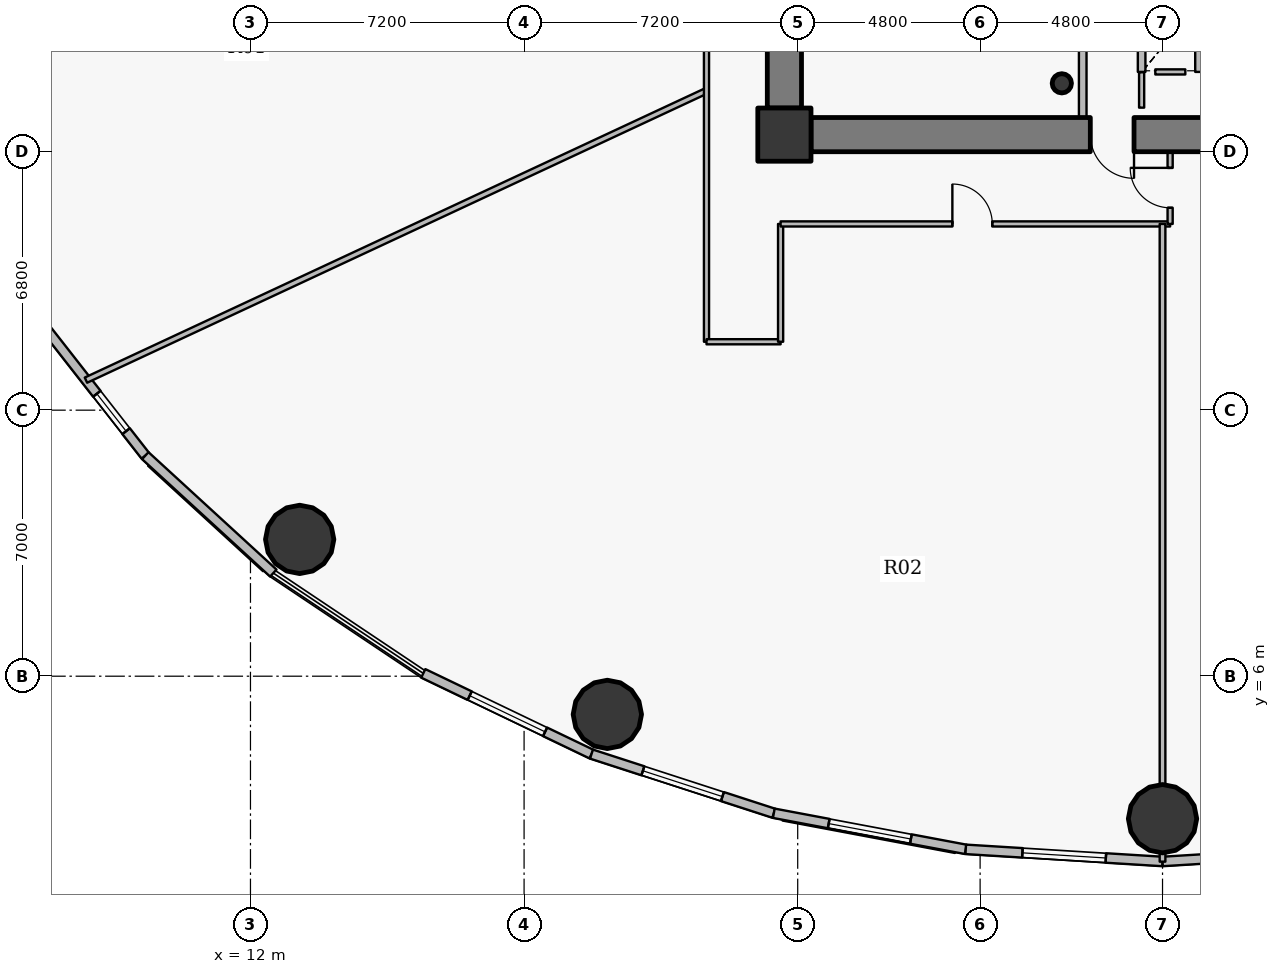
"""IFC4 building model, lengths in metres.
Left out: names, types, materials, properties, quantities, classifications, styles, units other than length and angle.
Written with IfcOpenShell. Run it as: python <this file> out.ifc"""

import sys

from ifc_helpers import new_model, si_unit, direction, frame, frame_2d, origin, origin_2d, place, context, subcontext, project, spatial, rectangle, hollow_circle, extrude, source, transform, mapped, element, fill, save


model = new_model("IFC4")
c1 = context("Model", 3, precision=1e-05, world=origin(), true_north=direction((0.0, 1.0)))
c2 = subcontext(c1, "Body", "Model", "MODEL_VIEW")
j1 = project(units=[si_unit("LENGTHUNIT", "METRE"), si_unit("PLANEANGLEUNIT", "RADIAN")], contexts=[c1])
p1 = place(None, origin())
s1 = spatial("IfcSite", under=j1, at=p1, CompositionType="ELEMENT")
p2 = place(p1, origin())
s2 = spatial("IfcBuilding", under=s1, at=p2, CompositionType="ELEMENT")
p3 = place(p2, frame((0.0, 0.0, 22.8)))
s3 = spatial("IfcBuildingStorey", under=s2, at=p3, CompositionType="ELEMENT", Elevation=22.8)
p4 = place(p3, frame((26.05, 20.25, 0.0), z_axis=(0.0, 0.0, 1.0), x_axis=(1.0, 0.0, 0.0)))
e1 = element("IfcColumn", 1, at=p4, inside=s3, PredefinedType="COLUMN", context=c2, shape_type="SweptSolid", body=[
    extrude(rectangle(XDim=1.4, YDim=1.4, at=origin_2d()), origin(), (0.0, 0.0, 1.0), 4.2),
])
p5 = place(p3, frame((33.35, 21.6, 0.0), z_axis=(0.0, 0.0, 1.0), x_axis=(1.0, 0.0, 0.0)))
e2 = element("IfcColumn", 2, at=p5, inside=s3, PredefinedType="COLUMN", context=c2, shape_type="SweptSolid", body=[
    extrude(hollow_circle(Radius=0.254, WallThickness=0.02, at=origin_2d()), origin(), (0.0, 0.0, 1.0), 4.2),
])
p6 = place(p3, frame((45.25, 20.25, 0.0), z_axis=(0.0, 0.0, 1.0), x_axis=(-1.0, 0.0, 0.0)))
e3 = element("IfcWall", 3, at=p6, inside=s3, PredefinedType="SHEAR", context=c2, shape_type="SweptSolid", body=[
    extrude(rectangle(XDim=18.5, YDim=0.9, at=frame_2d((9.25, 0.0))), origin(), (0.0, 0.0, 1.0), 3.35),
])
p7 = place(p6, frame((10.0, 0.0, 0.0)))
e4 = element("IfcOpeningElement", 4, at=p7, cuts=e3, PredefinedType="OPENING", context=c2, shape_type="SweptSolid", body=[
    extrude(rectangle(XDim=1.15, YDim=2.15, at=origin_2d()), frame((0.575, 0.46, 1.075), z_axis=(0.0, -1.0, 0.0), x_axis=(1.0, 0.0, 0.0)), (0.0, 0.0, 1.0), 0.92),
])
p8 = place(p3, frame((26.05, 20.95, 0.0), z_axis=(0.0, 0.0, 1.0), x_axis=(0.0, 1.0, 0.0)))
e5 = element("IfcWall", 5, at=p8, inside=s3, PredefinedType="SHEAR", context=c2, shape_type="SweptSolid", body=[
    extrude(rectangle(XDim=12.1, YDim=0.9, at=frame_2d((6.05, 0.0))), origin(), (0.0, 0.0, 1.0), 3.35),
])
p9 = place(p8, frame((5.64, 0.0, 0.0)))
e6 = element("IfcOpeningElement", 6, at=p9, cuts=e5, PredefinedType="OPENING", context=c2, shape_type="SweptSolid", body=[
    extrude(rectangle(XDim=0.82, YDim=2.1, at=origin_2d()), frame((0.41, 0.46, 1.05), z_axis=(0.0, -1.0, 0.0), x_axis=(1.0, 0.0, 0.0)), (0.0, 0.0, 1.0), 0.92),
])
for number, where, z_axis, x_axis in (
    (7, (13.295, 9.599, 0.0), (0.0, 0.0, 1.0), (1.0, 0.0, 0.0)),
    (8, (21.391, 4.995, 0.0), (0.0, 0.0, 1.0), (1.0, 0.0, 0.0)),
    (9, (36.0, 2.25, 0.0), (0.0, 0.0, 1.0), (1.0, 0.0, 0.0)),
):
    element("IfcColumn", number, at=place(p3, frame(where, z_axis=z_axis, x_axis=x_axis)), inside=s3, PredefinedType="COLUMN", context=c2, shape_type="SweptSolid", body=[
        extrude(hollow_circle(Radius=0.9, WallThickness=0.05, at=origin_2d()), origin(), (0.0, 0.0, 1.0), 4.2),
    ])
p10 = place(p3, frame((9.232, 11.802, 0.0), z_axis=(0.0, 0.0, 1.0), x_axis=(-0.61622589112, 0.787569457961, 0.0)))
e10 = element("IfcWall", 10, at=p10, inside=s3, PredefinedType="SOLIDWALL", context=c2, shape_type="SweptSolid", body=[
    extrude(rectangle(XDim=4.396, YDim=0.25, at=frame_2d((2.198, 0.0))), origin(), (0.0, 0.0, 1.0), 3.9),
])
p11 = place(p10, frame((0.819, 0.0, 0.9)))
e11 = element("IfcOpeningElement", 11, at=p11, cuts=e10, PredefinedType="OPENING", context=c2, shape_type="SweptSolid", body=[
    extrude(rectangle(XDim=1.25, YDim=1.65, at=origin_2d()), frame((0.625, 0.135, 0.825), z_axis=(0.0, -1.0, 0.0), x_axis=(1.0, 0.0, 0.0)), (0.0, 0.0, 1.0), 0.27),
])
p12 = place(p3, frame((12.601, 8.714, 0.0), z_axis=(0.0, 0.0, 1.0), x_axis=(-0.737076532105, 0.675809282136, 0.0)))
e12 = element("IfcWall", 12, at=p12, inside=s3, PredefinedType="SOLIDWALL", context=c2, shape_type="SweptSolid", body=[
    extrude(rectangle(XDim=4.571, YDim=0.25, at=frame_2d((2.285, 0.0))), origin(), (0.0, 0.0, 1.0), 3.9),
])
p13 = place(p3, frame((20.974, 3.95, 0.0), z_axis=(0.0, 0.0, 1.0), x_axis=(-0.901559523397, 0.432655088692, 0.0)))
e13 = element("IfcWall", 13, at=p13, inside=s3, PredefinedType="SOLIDWALL", context=c2, shape_type="SweptSolid", body=[
    extrude(rectangle(XDim=4.91, YDim=0.25, at=frame_2d((2.455, 0.0))), origin(), (0.0, 0.0, 1.0), 3.9),
])
p14 = place(p13, frame((1.355, 0.0, 0.9)))
e14 = element("IfcOpeningElement", 14, at=p14, cuts=e13, PredefinedType="OPENING", context=c2, shape_type="SweptSolid", body=[
    extrude(rectangle(XDim=2.2, YDim=2.0, at=origin_2d()), frame((1.1, 0.135, 1.0), z_axis=(0.0, -1.0, 0.0), x_axis=(1.0, 0.0, 0.0)), (0.0, 0.0, 1.0), 0.27),
])
p15 = place(p3, frame((25.771, 2.394, 0.0), z_axis=(0.0, 0.0, 1.0), x_axis=(-0.951198629726, 0.308579271513, 0.0)))
e15 = element("IfcWall", 15, at=p15, inside=s3, PredefinedType="SOLIDWALL", context=c2, shape_type="SweptSolid", body=[
    extrude(rectangle(XDim=5.044, YDim=0.25, at=frame_2d((2.522, 0.0))), origin(), (0.0, 0.0, 1.0), 3.9),
])
p16 = place(p15, frame((1.422, 0.0, 0.9)))
e16 = element("IfcOpeningElement", 16, at=p16, cuts=e15, PredefinedType="OPENING", context=c2, shape_type="SweptSolid", body=[
    extrude(rectangle(XDim=2.2, YDim=2.0, at=origin_2d()), frame((1.1, 0.135, 1.0), z_axis=(0.0, -1.0, 0.0), x_axis=(1.0, 0.0, 0.0)), (0.0, 0.0, 1.0), 0.27),
])
p17 = place(p3, frame((30.822, 1.444, 0.0), z_axis=(0.0, 0.0, 1.0), x_axis=(-0.98278278947, 0.184764684726, 0.0)))
e17 = element("IfcWall", 17, at=p17, inside=s3, PredefinedType="SOLIDWALL", context=c2, shape_type="SweptSolid", body=[
    extrude(rectangle(XDim=5.139, YDim=0.25, at=frame_2d((2.569, 0.0))), origin(), (0.0, 0.0, 1.0), 3.9),
])
p18 = place(p17, frame((1.469, 0.0, 0.9)))
e18 = element("IfcOpeningElement", 18, at=p18, cuts=e17, PredefinedType="OPENING", context=c2, shape_type="SweptSolid", body=[
    extrude(rectangle(XDim=2.2, YDim=2.0, at=origin_2d()), frame((1.1, 0.135, 1.0), z_axis=(0.0, -1.0, 0.0), x_axis=(1.0, 0.0, 0.0)), (0.0, 0.0, 1.0), 0.27),
])
p19 = place(p3, frame((36.0, 1.125, 0.0), z_axis=(0.0, 0.0, 1.0), x_axis=(-0.998106762298, 0.061505211614, 0.0)))
e19 = element("IfcWall", 19, at=p19, inside=s3, PredefinedType="SOLIDWALL", context=c2, shape_type="SweptSolid", body=[
    extrude(rectangle(XDim=5.188, YDim=0.25, at=frame_2d((2.594, 0.0))), origin(), (0.0, 0.0, 1.0), 3.9),
])
p20 = place(p19, frame((1.494, 0.0, 0.9)))
e20 = element("IfcOpeningElement", 20, at=p20, cuts=e19, PredefinedType="OPENING", context=c2, shape_type="SweptSolid", body=[
    extrude(rectangle(XDim=2.2, YDim=2.0, at=origin_2d()), frame((1.1, 0.135, 1.0), z_axis=(0.0, -1.0, 0.0), x_axis=(1.0, 0.0, 0.0)), (0.0, 0.0, 1.0), 0.27),
])
p21 = place(p3, frame((41.178, 1.444, 0.0), z_axis=(0.0, 0.0, 1.0), x_axis=(-0.998106762298, -0.061505211614, 0.0)))
e21 = element("IfcWall", 21, at=p21, inside=s3, PredefinedType="SOLIDWALL", context=c2, shape_type="SweptSolid", body=[
    extrude(rectangle(XDim=5.188, YDim=0.25, at=frame_2d((2.594, 0.0))), origin(), (0.0, 0.0, 1.0), 3.9),
])
p22 = place(p21, frame((1.494, 0.0, 0.9)))
e22 = element("IfcOpeningElement", 22, at=p22, cuts=e21, PredefinedType="OPENING", context=c2, shape_type="SweptSolid", body=[
    extrude(rectangle(XDim=2.2, YDim=2.0, at=origin_2d()), frame((1.1, 0.135, 1.0), z_axis=(0.0, -1.0, 0.0), x_axis=(1.0, 0.0, 0.0)), (0.0, 0.0, 1.0), 0.27),
])
p23 = place(p3, frame((7.671, 13.79, 0.0), z_axis=(0.0, 0.0, 1.0), x_axis=(0.906305303078, 0.422623588567, 0.0)))
e23 = element("IfcWall", 23, at=p23, inside=s3, PredefinedType="PARTITIONING", context=c2, shape_type="SweptSolid", body=[
    extrude(rectangle(XDim=18.017, YDim=0.15, at=frame_2d((9.009, 0.0))), origin(), (0.0, 0.0, 1.0), 3.085),
])
p24 = place(p3, frame((24.0, 14.8, 0.0), z_axis=(0.0, 0.0, 1.0), x_axis=(0.0, 1.0, 0.0)))
e24 = element("IfcWall", 24, at=p24, inside=s3, PredefinedType="PARTITIONING", context=c2, shape_type="SweptSolid", body=[
    extrude(rectangle(XDim=12.78, YDim=0.135, at=frame_2d((6.39, 0.0))), origin(), (0.0, 0.0, 1.0), 2.685),
])
p25 = place(p24, frame((9.147, 0.0, 0.0)))
e25 = element("IfcOpeningElement", 25, at=p25, cuts=e24, PredefinedType="OPENING", context=c2, shape_type="SweptSolid", body=[
    extrude(rectangle(XDim=1.05, YDim=2.15, at=origin_2d()), frame((0.525, 0.078, 1.075), z_axis=(0.0, -1.0, 0.0), x_axis=(1.0, 0.0, 0.0)), (0.0, 0.0, 1.0), 0.155),
])
p26 = place(p3, frame((24.0, 14.8, 0.0), z_axis=(0.0, 0.0, 1.0), x_axis=(1.0, 0.0, 0.0)))
e26 = element("IfcWall", 26, at=p26, inside=s3, PredefinedType="PARTITIONING", context=c2, shape_type="SweptSolid", body=[
    extrude(rectangle(XDim=1.95, YDim=0.135, at=frame_2d((0.975, 0.0))), origin(), (0.0, 0.0, 1.0), 3.9),
])
p27 = place(p3, frame((25.95, 14.8, 0.0), z_axis=(0.0, 0.0, 1.0), x_axis=(0.0, 1.0, 0.0)))
e27 = element("IfcWall", 27, at=p27, inside=s3, PredefinedType="PARTITIONING", context=c2, shape_type="SweptSolid", body=[
    extrude(rectangle(XDim=3.1, YDim=0.135, at=frame_2d((1.55, 0.0))), origin(), (0.0, 0.0, 1.0), 3.9),
])
p28 = place(p3, frame((25.95, 17.9, 0.0), z_axis=(0.0, 0.0, 1.0), x_axis=(1.0, 0.0, 0.0)))
e28 = element("IfcWall", 28, at=p28, inside=s3, PredefinedType="PARTITIONING", context=c2, shape_type="SweptSolid", body=[
    extrude(rectangle(XDim=10.25, YDim=0.135, at=frame_2d((5.125, 0.0))), origin(), (0.0, 0.0, 1.0), 2.685),
])
p29 = place(p28, frame((4.52, 0.0, 0.0)))
e29 = element("IfcOpeningElement", 29, at=p29, cuts=e28, PredefinedType="OPENING", context=c2, shape_type="SweptSolid", body=[
    extrude(rectangle(XDim=1.05, YDim=2.15, at=origin_2d()), frame((0.525, 0.078, 1.075), z_axis=(0.0, -1.0, 0.0), x_axis=(1.0, 0.0, 0.0)), (0.0, 0.0, 1.0), 0.155),
])
p30 = place(p3, frame((33.9, 20.7, 0.0), z_axis=(0.0, 0.0, 1.0), x_axis=(0.0, 1.0, 0.0)))
e30 = element("IfcWall", 30, at=p30, inside=s3, PredefinedType="PARTITIONING", context=c2, shape_type="SweptSolid", body=[
    extrude(rectangle(XDim=11.4, YDim=0.2, at=frame_2d((5.7, 0.0))), origin(), (0.0, 0.0, 1.0), 3.485),
])
p31 = place(p3, frame((35.45, 21.9, 0.0), z_axis=(0.0, 0.0, 1.0), x_axis=(0.0, 1.0, 0.0)))
e31 = element("IfcWall", 31, at=p31, inside=s3, PredefinedType="PARTITIONING", context=c2, shape_type="SweptSolid", body=[
    extrude(rectangle(XDim=1.8, YDim=0.2, at=frame_2d((0.9, 0.0))), origin(), (0.0, 0.0, 1.0), 3.9),
])
p32 = place(p3, frame((36.0, 1.12, 0.0), z_axis=(0.0, 0.0, 1.0), x_axis=(0.0, 1.0, 0.0)))
e32 = element("IfcWall", 32, at=p32, inside=s3, PredefinedType="PARTITIONING", context=c2, shape_type="SweptSolid", body=[
    extrude(rectangle(XDim=16.78, YDim=0.15, at=frame_2d((8.39, 0.0))), origin(), (0.0, 0.0, 1.0), 2.685),
])
p33 = place(p3, frame((36.2, 17.9, 0.0), z_axis=(0.0, 0.0, 1.0), x_axis=(0.0, 1.0, 0.0)))
e33 = element("IfcWall", 33, at=p33, inside=s3, PredefinedType="PARTITIONING", context=c2, shape_type="SweptSolid", body=[
    extrude(rectangle(XDim=1.9, YDim=0.135, at=frame_2d((0.95, 0.0))), origin(), (0.0, 0.0, 1.0), 2.685),
])
p34 = place(p33, frame((0.425, 0.0, 0.0)))
e34 = element("IfcOpeningElement", 34, at=p34, cuts=e33, PredefinedType="OPENING", context=c2, shape_type="SweptSolid", body=[
    extrude(rectangle(XDim=1.05, YDim=2.15, at=origin_2d()), frame((0.525, 0.078, 1.075), z_axis=(0.0, -1.0, 0.0), x_axis=(1.0, 0.0, 0.0)), (0.0, 0.0, 1.0), 0.155),
])
p35 = place(p3, frame((36.96, 21.9, 0.0), z_axis=(0.0, 0.0, 1.0), x_axis=(0.0, 1.0, 0.0)))
e35 = element("IfcWall", 35, at=p35, inside=s3, PredefinedType="PARTITIONING", context=c2, shape_type="SweptSolid", body=[
    extrude(rectangle(XDim=1.8, YDim=0.2, at=frame_2d((0.9, 0.0))), origin(), (0.0, 0.0, 1.0), 3.9),
])
p36 = place(p3, frame((36.6, 21.9, 0.0), z_axis=(0.0, 0.0, 1.0), x_axis=(-1.0, 0.0, 0.0)))
e36 = element("IfcWall", 36, at=p36, inside=s3, PredefinedType="PARTITIONING", context=c2, shape_type="SweptSolid", body=[
    extrude(rectangle(XDim=0.79, YDim=0.135, at=frame_2d((0.395, 0.0))), origin(), (0.0, 0.0, 1.0), 3.9),
])
p37 = place(p3, frame((35.45, 21.89, 0.0), z_axis=(0.0, 0.0, 1.0), x_axis=(0.0, -1.0, 0.0)))
e37 = element("IfcWall", 37, at=p37, inside=s3, PredefinedType="PARTITIONING", context=c2, shape_type="SweptSolid", body=[
    extrude(rectangle(XDim=0.93, YDim=0.135, at=frame_2d((0.465, 0.0))), origin(), (0.0, 0.0, 1.0), 3.485),
])
p38 = place(p3, frame((25.6, 20.94, 0.0), z_axis=(0.0, 0.0, 1.0), x_axis=(0.0, -1.0, 0.0)))
e38 = element("IfcWall", 38, at=p38, inside=s3, PredefinedType="PARTITIONING", context=c2, shape_type="SweptSolid", body=[
    extrude(rectangle(XDim=1.14, YDim=0.135, at=frame_2d((0.57, 0.0))), origin(), (0.0, 0.0, 1.0), 3.9),
])
p39 = place(p3, frame((25.907, 19.8, 0.0), z_axis=(0.0, 0.0, 1.0), x_axis=(1.0, 0.0, 0.0)))
e39 = element("IfcWall", 39, at=p39, inside=s3, PredefinedType="PARTITIONING", context=c2, shape_type="SweptSolid", body=[
    extrude(rectangle(XDim=0.833, YDim=0.135, at=frame_2d((0.416, 0.0))), origin(), (0.0, 0.0, 1.0), 2.685),
])
m1 = source(origin(), c2, "Body", "SweptSolid", [
    extrude(rectangle(XDim=1.25, YDim=1.65, at=origin_2d()), frame((0.625, 0.03, 0.825), z_axis=(0.0, -1.0, 0.0), x_axis=(1.0, 0.0, 0.0)), (0.0, 0.0, 1.0), 0.06),
])
p40 = place(p11, origin())
e40 = element("IfcWindow", 40, at=p40, inside=s3, PartitioningType="SINGLE_PANEL", PredefinedType="WINDOW", context=c2, shape_type="MappedRepresentation", body=[
    mapped(m1, transform((0.0, 0.0, 0.0), x_axis=(1.0, 0.0, 0.0), y_axis=(0.0, 1.0, 0.0), z_axis=(0.0, 0.0, 1.0), scale=1.0)),
])
fill(e11, e40)
m2 = source(origin(), c2, "Body", "SweptSolid", [
    extrude(rectangle(XDim=2.2, YDim=2.0, at=origin_2d()), frame((1.1, 0.03, 1.0), z_axis=(0.0, -1.0, 0.0), x_axis=(1.0, 0.0, 0.0)), (0.0, 0.0, 1.0), 0.06),
])
p41 = place(p14, origin())
e41 = element("IfcWindow", 41, at=p41, inside=s3, PartitioningType="TRIPLE_PANEL_VERTICAL", PredefinedType="WINDOW", context=c2, shape_type="MappedRepresentation", body=[
    mapped(m2, transform((0.0, 0.0, 0.0), x_axis=(1.0, 0.0, 0.0), y_axis=(0.0, 1.0, 0.0), z_axis=(0.0, 0.0, 1.0), scale=1.0)),
])
fill(e14, e41)
p42 = place(p16, origin())
e42 = element("IfcWindow", 42, at=p42, inside=s3, PartitioningType="TRIPLE_PANEL_VERTICAL", PredefinedType="WINDOW", context=c2, shape_type="MappedRepresentation", body=[
    mapped(m2, transform((0.0, 0.0, 0.0), x_axis=(1.0, 0.0, 0.0), y_axis=(0.0, 1.0, 0.0), z_axis=(0.0, 0.0, 1.0), scale=1.0)),
])
fill(e16, e42)
p43 = place(p18, origin())
e43 = element("IfcWindow", 43, at=p43, inside=s3, PartitioningType="TRIPLE_PANEL_VERTICAL", PredefinedType="WINDOW", context=c2, shape_type="MappedRepresentation", body=[
    mapped(m2, transform((0.0, 0.0, 0.0), x_axis=(1.0, 0.0, 0.0), y_axis=(0.0, 1.0, 0.0), z_axis=(0.0, 0.0, 1.0), scale=1.0)),
])
fill(e18, e43)
p44 = place(p20, origin())
e44 = element("IfcWindow", 44, at=p44, inside=s3, PartitioningType="TRIPLE_PANEL_VERTICAL", PredefinedType="WINDOW", context=c2, shape_type="MappedRepresentation", body=[
    mapped(m2, transform((0.0, 0.0, 0.0), x_axis=(1.0, 0.0, 0.0), y_axis=(0.0, 1.0, 0.0), z_axis=(0.0, 0.0, 1.0), scale=1.0)),
])
fill(e20, e44)
m3 = source(origin(), c2, "Body", "SweptSolid", [
    extrude(rectangle(XDim=1.15, YDim=2.15, at=origin_2d()), frame((0.575, 0.025, 1.075), z_axis=(0.0, -1.0, 0.0), x_axis=(1.0, 0.0, 0.0)), (0.0, 0.0, 1.0), 0.05),
])
p45 = place(p7, origin())
e45 = element("IfcDoor", 45, at=p45, inside=s3, OperationType="SINGLE_SWING_LEFT", PredefinedType="DOOR", context=c2, shape_type="MappedRepresentation", body=[
    mapped(m3, transform((0.0, 0.0, 0.0), x_axis=(1.0, 0.0, 0.0), y_axis=(0.0, 1.0, 0.0), z_axis=(0.0, 0.0, 1.0), scale=1.0)),
])
fill(e4, e45)
m4 = source(origin(), c2, "Body", "SweptSolid", [
    extrude(rectangle(XDim=1.05, YDim=2.15, at=origin_2d()), frame((0.525, 0.025, 1.075), z_axis=(0.0, -1.0, 0.0), x_axis=(1.0, 0.0, 0.0)), (0.0, 0.0, 1.0), 0.05),
])
p46 = place(p29, origin())
e46 = element("IfcDoor", 46, at=p46, inside=s3, OperationType="SINGLE_SWING_LEFT", PredefinedType="DOOR", context=c2, shape_type="MappedRepresentation", body=[
    mapped(m4, transform((0.0, 0.0, 0.0), x_axis=(1.0, 0.0, 0.0), y_axis=(0.0, 1.0, 0.0), z_axis=(0.0, 0.0, 1.0), scale=1.0)),
])
fill(e29, e46)
p47 = place(p34, origin())
e47 = element("IfcDoor", 47, at=p47, inside=s3, OperationType="SINGLE_SWING_RIGHT", PredefinedType="DOOR", context=c2, shape_type="MappedRepresentation", body=[
    mapped(m4, transform((0.0, 0.0, 0.0), x_axis=(1.0, 0.0, 0.0), y_axis=(0.0, 1.0, 0.0), z_axis=(0.0, 0.0, 1.0), scale=1.0)),
])
fill(e34, e47)
save(model, sys.argv[1])
